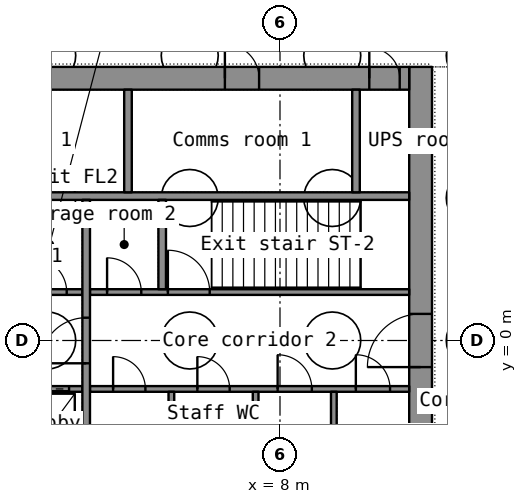
"""IFC4 building model, lengths in metres.
Left out: names, types, materials, properties, quantities, classifications, styles, units other than length and angle.
Written with IfcOpenShell. Run it as: python <this file> out.ifc"""

import sys

from ifc_helpers import new_model, si_unit, direction, frame, frame_2d, origin, place, context, subcontext, project, spatial, rectangle, extrude, element, fill, save


model = new_model("IFC4")
c1 = context("Model", 3, precision=1e-05, world=origin(), true_north=direction((0.0, 1.0)))
c2 = subcontext(c1, "Body", "Model", "MODEL_VIEW")
j1 = project(units=[si_unit("LENGTHUNIT", "METRE"), si_unit("PLANEANGLEUNIT", "RADIAN")], contexts=[c1])
p1 = place(None, origin())
s1 = spatial("IfcSite", under=j1, at=p1, CompositionType="ELEMENT")
p2 = place(p1, origin())
s2 = spatial("IfcBuilding", under=s1, at=p2, CompositionType="ELEMENT")
p3 = place(p2, frame((0.0, 0.0, -5.0)))
s3 = spatial("IfcBuildingStorey", under=s2, at=p3, CompositionType="ELEMENT", Elevation=-5.0)
p4 = place(p3, frame((11.7, -7.2, 0.0), z_axis=(0.0, 0.0, 1.0), x_axis=(0.0, 1.0, 0.0)))
e1 = element("IfcWall", 1, at=p4, inside=s3, PredefinedType="SHEAR", context=c2, shape_type="SweptSolid", body=[
    extrude(rectangle(XDim=14.4, YDim=0.6, at=frame_2d((7.2, 0.0))), origin(), (0.0, 0.0, 1.0), 4.6),
])
p5 = place(p4, frame((6.5, 0.0, 0.0)))
e2 = element("IfcOpeningElement", 2, at=p5, cuts=e1, PredefinedType="OPENING", context=c2, shape_type="SweptSolid", body=[
    extrude(rectangle(XDim=1.4, YDim=2.2, at=frame_2d((0.7, 1.1))), frame((0.0, 0.31, 0.0), z_axis=(0.0, -1.0, 0.0), x_axis=(1.0, 0.0, 0.0)), (0.0, 0.0, 1.0), 0.62),
])
p6 = place(p3, frame((-11.4, 6.9, 0.0), z_axis=(0.0, 0.0, 1.0), x_axis=(1.0, 0.0, 0.0)))
e3 = element("IfcWall", 3, at=p6, inside=s3, PredefinedType="SHEAR", context=c2, shape_type="SweptSolid", body=[
    extrude(rectangle(XDim=22.8, YDim=0.6, at=frame_2d((11.4, 0.0))), origin(), (0.0, 0.0, 1.0), 4.6),
])
p7 = place(p6, frame((1.85, 0.0, 0.0)))
e4 = element("IfcOpeningElement", 4, at=p7, cuts=e3, PredefinedType="OPENING", context=c2, shape_type="SweptSolid", body=[
    extrude(rectangle(XDim=1.1, YDim=2.2, at=frame_2d((0.55, 1.1))), frame((0.0, 0.31, 0.0), z_axis=(0.0, -1.0, 0.0), x_axis=(1.0, 0.0, 0.0)), (0.0, 0.0, 1.0), 0.62),
])
p8 = place(p6, frame((6.95, 0.0, 0.0)))
e5 = element("IfcOpeningElement", 5, at=p8, cuts=e3, PredefinedType="OPENING", context=c2, shape_type="SweptSolid", body=[
    extrude(rectangle(XDim=0.9, YDim=2.1, at=frame_2d((0.45, 1.05))), frame((0.0, 0.31, 0.0), z_axis=(0.0, -1.0, 0.0), x_axis=(1.0, 0.0, 0.0)), (0.0, 0.0, 1.0), 0.62),
])
p9 = place(p6, frame((11.95, 0.0, 0.0)))
e6 = element("IfcOpeningElement", 6, at=p9, cuts=e3, PredefinedType="OPENING", context=c2, shape_type="SweptSolid", body=[
    extrude(rectangle(XDim=0.9, YDim=2.1, at=frame_2d((0.45, 1.05))), frame((0.0, 0.31, 0.0), z_axis=(0.0, -1.0, 0.0), x_axis=(1.0, 0.0, 0.0)), (0.0, 0.0, 1.0), 0.62),
])
p10 = place(p6, frame((17.95, 0.0, 0.0)))
e7 = element("IfcOpeningElement", 7, at=p10, cuts=e3, PredefinedType="OPENING", context=c2, shape_type="SweptSolid", body=[
    extrude(rectangle(XDim=0.9, YDim=2.1, at=frame_2d((0.45, 1.05))), frame((0.0, 0.31, 0.0), z_axis=(0.0, -1.0, 0.0), x_axis=(1.0, 0.0, 0.0)), (0.0, 0.0, 1.0), 0.62),
])
p11 = place(p6, frame((0.25, 0.0, 0.0)))
e8 = element("IfcOpeningElement", 8, at=p11, cuts=e3, PredefinedType="OPENING", context=c2, shape_type="SweptSolid", body=[
    extrude(rectangle(XDim=0.8, YDim=2.05, at=frame_2d((0.4, 1.025))), frame((0.0, 0.31, 0.0), z_axis=(0.0, -1.0, 0.0), x_axis=(1.0, 0.0, 0.0)), (0.0, 0.0, 1.0), 0.62),
])
p12 = place(p6, frame((21.75, 0.0, 0.0)))
e9 = element("IfcOpeningElement", 9, at=p12, cuts=e3, PredefinedType="OPENING", context=c2, shape_type="SweptSolid", body=[
    extrude(rectangle(XDim=0.8, YDim=2.05, at=frame_2d((0.4, 1.025))), frame((0.0, 0.31, 0.0), z_axis=(0.0, -1.0, 0.0), x_axis=(1.0, 0.0, 0.0)), (0.0, 0.0, 1.0), 0.62),
])
p13 = place(p3, frame((-11.4, 3.8, 0.0), z_axis=(0.0, 0.0, 1.0), x_axis=(1.0, 0.0, 0.0)))
e10 = element("IfcWall", 10, at=p13, inside=s3, PredefinedType="SHEAR", context=c2, shape_type="SweptSolid", body=[
    extrude(rectangle(XDim=22.8, YDim=0.2, at=frame_2d((11.4, 0.0))), origin(), (0.0, 0.0, 1.0), 4.6),
])
p14 = place(p3, frame((10.0, 3.9, 0.0), z_axis=(0.0, 0.0, 1.0), x_axis=(0.0, 1.0, 0.0)))
e11 = element("IfcWall", 11, at=p14, inside=s3, PredefinedType="SHEAR", context=c2, shape_type="SweptSolid", body=[
    extrude(rectangle(XDim=2.7, YDim=0.2, at=frame_2d((1.35, 0.0))), origin(), (0.0, 0.0, 1.0), 4.6),
])
p15 = place(p3, frame((4.0, 3.9, 0.0), z_axis=(0.0, 0.0, 1.0), x_axis=(0.0, 1.0, 0.0)))
e12 = element("IfcWall", 12, at=p15, inside=s3, PredefinedType="PARTITIONING", context=c2, shape_type="SweptSolid", body=[
    extrude(rectangle(XDim=2.7, YDim=0.2, at=frame_2d((1.35, 0.0))), origin(), (0.0, 0.0, 1.0), 4.6),
])
p16 = place(p3, frame((-2.8, -1.275, 0.0), z_axis=(0.0, 0.0, 1.0), x_axis=(1.0, 0.0, 0.0)))
e13 = element("IfcWall", 13, at=p16, inside=s3, PredefinedType="SHEAR", context=c2, shape_type="SweptSolid", body=[
    extrude(rectangle(XDim=5.6, YDim=0.15, at=frame_2d((2.8, 0.0))), origin(), (0.0, 0.0, 1.0), 4.6),
])
p17 = place(p16, frame((4.15, 0.0, 0.0)))
e14 = element("IfcOpeningElement", 14, at=p17, cuts=e13, PredefinedType="OPENING", context=c2, shape_type="SweptSolid", body=[
    extrude(rectangle(XDim=1.1, YDim=2.2, at=frame_2d((0.55, 1.1))), frame((0.0, 0.085, 0.0), z_axis=(0.0, -1.0, 0.0), x_axis=(1.0, 0.0, 0.0)), (0.0, 0.0, 1.0), 0.17),
])
p18 = place(p16, frame((0.499, 0.0, 0.0)))
e15 = element("IfcOpeningElement", 15, at=p18, cuts=e13, PredefinedType="OPENING", context=c2, shape_type="SweptSolid", body=[
    extrude(rectangle(XDim=0.9, YDim=2.1, at=frame_2d((0.45, 1.05))), frame((0.0, 0.085, 0.0), z_axis=(0.0, -1.0, 0.0), x_axis=(1.0, 0.0, 0.0)), (0.0, 0.0, 1.0), 0.17),
])
p19 = place(p16, frame((2.374, 0.0, 0.0)))
e16 = element("IfcOpeningElement", 16, at=p19, cuts=e13, PredefinedType="OPENING", context=c2, shape_type="SweptSolid", body=[
    extrude(rectangle(XDim=0.9, YDim=2.1, at=frame_2d((0.45, 1.05))), frame((0.0, 0.085, 0.0), z_axis=(0.0, -1.0, 0.0), x_axis=(1.0, 0.0, 0.0)), (0.0, 0.0, 1.0), 0.17),
])
p20 = place(p3, frame((3.0, -1.275, 0.0), z_axis=(0.0, 0.0, 1.0), x_axis=(1.0, 0.0, 0.0)))
e17 = element("IfcWall", 17, at=p20, inside=s3, PredefinedType="PARTITIONING", context=c2, shape_type="SweptSolid", body=[
    extrude(rectangle(XDim=8.4, YDim=0.15, at=frame_2d((4.2, 0.0))), origin(), (0.0, 0.0, 1.0), 4.6),
])
p21 = place(p20, frame((0.608, 0.0, 0.0)))
e18 = element("IfcOpeningElement", 18, at=p21, cuts=e17, PredefinedType="OPENING", context=c2, shape_type="SweptSolid", body=[
    extrude(rectangle(XDim=0.85, YDim=2.1, at=frame_2d((0.425, 1.05))), frame((0.0, 0.085, 0.0), z_axis=(0.0, -1.0, 0.0), x_axis=(1.0, 0.0, 0.0)), (0.0, 0.0, 1.0), 0.17),
])
p22 = place(p20, frame((2.825, 0.0, 0.0)))
e19 = element("IfcOpeningElement", 19, at=p22, cuts=e17, PredefinedType="OPENING", context=c2, shape_type="SweptSolid", body=[
    extrude(rectangle(XDim=0.85, YDim=2.1, at=frame_2d((0.425, 1.05))), frame((0.0, 0.085, 0.0), z_axis=(0.0, -1.0, 0.0), x_axis=(1.0, 0.0, 0.0)), (0.0, 0.0, 1.0), 0.17),
])
p23 = place(p20, frame((4.938, 0.0, 0.0)))
e20 = element("IfcOpeningElement", 20, at=p23, cuts=e17, PredefinedType="OPENING", context=c2, shape_type="SweptSolid", body=[
    extrude(rectangle(XDim=0.9, YDim=2.1, at=frame_2d((0.45, 1.05))), frame((0.0, 0.085, 0.0), z_axis=(0.0, -1.0, 0.0), x_axis=(1.0, 0.0, 0.0)), (0.0, 0.0, 1.0), 0.17),
])
p24 = place(p20, frame((6.996, 0.0, 0.0)))
e21 = element("IfcOpeningElement", 21, at=p24, cuts=e17, PredefinedType="OPENING", context=c2, shape_type="SweptSolid", body=[
    extrude(rectangle(XDim=0.9, YDim=2.1, at=frame_2d((0.45, 1.05))), frame((0.0, 0.085, 0.0), z_axis=(0.0, -1.0, 0.0), x_axis=(1.0, 0.0, 0.0)), (0.0, 0.0, 1.0), 0.17),
])
p25 = place(p3, frame((-2.8, 1.275, 0.0), z_axis=(0.0, 0.0, 1.0), x_axis=(1.0, 0.0, 0.0)))
e22 = element("IfcWall", 22, at=p25, inside=s3, PredefinedType="SHEAR", context=c2, shape_type="SweptSolid", body=[
    extrude(rectangle(XDim=5.6, YDim=0.15, at=frame_2d((2.8, 0.0))), origin(), (0.0, 0.0, 1.0), 4.6),
])
p26 = place(p25, frame((0.35, 0.0, 0.0)))
e23 = element("IfcOpeningElement", 23, at=p26, cuts=e22, PredefinedType="OPENING", context=c2, shape_type="SweptSolid", body=[
    extrude(rectangle(XDim=1.1, YDim=2.2, at=frame_2d((0.55, 1.1))), frame((0.0, 0.085, 0.0), z_axis=(0.0, -1.0, 0.0), x_axis=(1.0, 0.0, 0.0)), (0.0, 0.0, 1.0), 0.17),
])
p27 = place(p25, frame((2.413, 0.0, 0.0)))
e24 = element("IfcOpeningElement", 24, at=p27, cuts=e22, PredefinedType="OPENING", context=c2, shape_type="SweptSolid", body=[
    extrude(rectangle(XDim=0.9, YDim=2.1, at=frame_2d((0.45, 1.05))), frame((0.0, 0.085, 0.0), z_axis=(0.0, -1.0, 0.0), x_axis=(1.0, 0.0, 0.0)), (0.0, 0.0, 1.0), 0.17),
])
p28 = place(p25, frame((4.288, 0.0, 0.0)))
e25 = element("IfcOpeningElement", 25, at=p28, cuts=e22, PredefinedType="OPENING", context=c2, shape_type="SweptSolid", body=[
    extrude(rectangle(XDim=0.9, YDim=2.1, at=frame_2d((0.45, 1.05))), frame((0.0, 0.085, 0.0), z_axis=(0.0, -1.0, 0.0), x_axis=(1.0, 0.0, 0.0)), (0.0, 0.0, 1.0), 0.17),
])
p29 = place(p3, frame((3.0, 1.275, 0.0), z_axis=(0.0, 0.0, 1.0), x_axis=(1.0, 0.0, 0.0)))
e26 = element("IfcWall", 26, at=p29, inside=s3, PredefinedType="SHEAR", context=c2, shape_type="SweptSolid", body=[
    extrude(rectangle(XDim=8.4, YDim=0.15, at=frame_2d((4.2, 0.0))), origin(), (0.0, 0.0, 1.0), 4.6),
])
p30 = place(p29, frame((2.05, 0.0, 0.0)))
e27 = element("IfcOpeningElement", 27, at=p30, cuts=e26, PredefinedType="OPENING", context=c2, shape_type="SweptSolid", body=[
    extrude(rectangle(XDim=1.1, YDim=2.15, at=frame_2d((0.55, 1.075))), frame((0.0, 0.085, 0.0), z_axis=(0.0, -1.0, 0.0), x_axis=(1.0, 0.0, 0.0)), (0.0, 0.0, 1.0), 0.17),
])
p31 = place(p29, frame((0.45, 0.0, 0.0)))
e28 = element("IfcOpeningElement", 28, at=p31, cuts=e26, PredefinedType="OPENING", context=c2, shape_type="SweptSolid", body=[
    extrude(rectangle(XDim=0.9, YDim=2.1, at=frame_2d((0.45, 1.05))), frame((0.0, 0.085, 0.0), z_axis=(0.0, -1.0, 0.0), x_axis=(1.0, 0.0, 0.0)), (0.0, 0.0, 1.0), 0.17),
])
p32 = place(p3, frame((2.9, -3.7, 0.0), z_axis=(0.0, 0.0, 1.0), x_axis=(0.0, 1.0, 0.0)))
e29 = element("IfcWall", 29, at=p32, inside=s3, PredefinedType="SHEAR", context=c2, shape_type="SweptSolid", body=[
    extrude(rectangle(XDim=7.4, YDim=0.2, at=frame_2d((3.7, 0.0))), origin(), (0.0, 0.0, 1.0), 4.6),
])
p33 = place(p32, frame((3.1, 0.0, 0.0)))
e30 = element("IfcOpeningElement", 30, at=p33, cuts=e29, PredefinedType="OPENING", context=c2, shape_type="SweptSolid", body=[
    extrude(rectangle(XDim=1.2, YDim=2.2, at=frame_2d((0.6, 1.1))), frame((0.0, 0.11, 0.0), z_axis=(0.0, -1.0, 0.0), x_axis=(1.0, 0.0, 0.0)), (0.0, 0.0, 1.0), 0.22),
])
p34 = place(p3, frame((4.9, 1.35, 0.0), z_axis=(0.0, 0.0, 1.0), x_axis=(0.0, 1.0, 0.0)))
e31 = element("IfcWall", 31, at=p34, inside=s3, PredefinedType="SHEAR", context=c2, shape_type="SweptSolid", body=[
    extrude(rectangle(XDim=2.35, YDim=0.2, at=frame_2d((1.175, 0.0))), origin(), (0.0, 0.0, 1.0), 4.6),
])
for number, where, z_axis, x_axis in (
    (32, (5.142, -3.7, 0.0), (0.0, 0.0, 1.0), (0.0, 1.0, 0.0)),
    (33, (7.359, -3.7, 0.0), (0.0, 0.0, 1.0), (0.0, 1.0, 0.0)),
    (34, (9.417, -3.7, 0.0), (0.0, 0.0, 1.0), (0.0, 1.0, 0.0)),
):
    element("IfcWall", number, at=place(p3, frame(where, z_axis=z_axis, x_axis=x_axis)), inside=s3, PredefinedType="PARTITIONING", context=c2, shape_type="SweptSolid", body=[
        extrude(rectangle(XDim=2.35, YDim=0.15, at=frame_2d((1.175, 0.0))), origin(), (0.0, 0.0, 1.0), 4.6),
    ])
p35 = place(p10, origin())
e35 = element("IfcDoor", 35, at=p35, inside=s3, OperationType="SINGLE_SWING_LEFT", PredefinedType="DOOR", context=c2, shape_type="SweptSolid", body=[
    extrude(rectangle(XDim=0.9, YDim=2.1, at=frame_2d((0.45, 1.05))), frame((0.0, 0.025, 0.0), z_axis=(0.0, -1.0, 0.0), x_axis=(1.0, 0.0, 0.0)), (0.0, 0.0, 1.0), 0.05),
])
fill(e7, e35)
p36 = place(p12, origin())
e36 = element("IfcDoor", 36, at=p36, inside=s3, OperationType="SINGLE_SWING_LEFT", PredefinedType="DOOR", context=c2, shape_type="SweptSolid", body=[
    extrude(rectangle(XDim=0.8, YDim=2.05, at=frame_2d((0.4, 1.025))), frame((0.0, 0.025, 0.0), z_axis=(0.0, -1.0, 0.0), x_axis=(1.0, 0.0, 0.0)), (0.0, 0.0, 1.0), 0.05),
])
fill(e9, e36)
p37 = place(p5, origin())
e37 = element("IfcDoor", 37, at=p37, inside=s3, OperationType="DOUBLE_DOOR_SINGLE_SWING", PredefinedType="DOOR", context=c2, shape_type="SweptSolid", body=[
    extrude(rectangle(XDim=1.4, YDim=2.2, at=frame_2d((0.7, 1.1))), frame((0.0, 0.025, 0.0), z_axis=(0.0, -1.0, 0.0), x_axis=(1.0, 0.0, 0.0)), (0.0, 0.0, 1.0), 0.05),
])
fill(e2, e37)
p38 = place(p33, origin())
e38 = element("IfcDoor", 38, at=p38, inside=s3, OperationType="SINGLE_SWING_LEFT", PredefinedType="DOOR", context=c2, shape_type="SweptSolid", body=[
    extrude(rectangle(XDim=1.2, YDim=2.2, at=frame_2d((0.6, 1.1))), frame((0.0, 0.025, 0.0), z_axis=(0.0, -1.0, 0.0), x_axis=(1.0, 0.0, 0.0)), (0.0, 0.0, 1.0), 0.05),
])
fill(e30, e38)
p39 = place(p17, origin())
e39 = element("IfcDoor", 39, at=p39, inside=s3, OperationType="DOUBLE_DOOR_SLIDING", PredefinedType="DOOR", context=c2, shape_type="SweptSolid", body=[
    extrude(rectangle(XDim=1.1, YDim=2.2, at=frame_2d((0.55, 1.1))), frame((0.0, 0.025, 0.0), z_axis=(0.0, -1.0, 0.0), x_axis=(1.0, 0.0, 0.0)), (0.0, 0.0, 1.0), 0.05),
])
fill(e14, e39)
p40 = place(p30, origin())
e40 = element("IfcDoor", 40, at=p40, inside=s3, OperationType="SINGLE_SWING_LEFT", PredefinedType="DOOR", context=c2, shape_type="SweptSolid", body=[
    extrude(rectangle(XDim=1.1, YDim=2.15, at=frame_2d((0.55, 1.075))), frame((0.0, 0.025, 0.0), z_axis=(0.0, -1.0, 0.0), x_axis=(1.0, 0.0, 0.0)), (0.0, 0.0, 1.0), 0.05),
])
fill(e27, e40)
p41 = place(p21, origin())
e41 = element("IfcDoor", 41, at=p41, inside=s3, OperationType="SINGLE_SWING_LEFT", PredefinedType="DOOR", context=c2, shape_type="SweptSolid", body=[
    extrude(rectangle(XDim=0.85, YDim=2.1, at=frame_2d((0.425, 1.05))), frame((0.0, 0.025, 0.0), z_axis=(0.0, -1.0, 0.0), x_axis=(1.0, 0.0, 0.0)), (0.0, 0.0, 1.0), 0.05),
])
fill(e18, e41)
p42 = place(p22, origin())
e42 = element("IfcDoor", 42, at=p42, inside=s3, OperationType="SINGLE_SWING_LEFT", PredefinedType="DOOR", context=c2, shape_type="SweptSolid", body=[
    extrude(rectangle(XDim=0.85, YDim=2.1, at=frame_2d((0.425, 1.05))), frame((0.0, 0.025, 0.0), z_axis=(0.0, -1.0, 0.0), x_axis=(1.0, 0.0, 0.0)), (0.0, 0.0, 1.0), 0.05),
])
fill(e19, e42)
p43 = place(p23, origin())
e43 = element("IfcDoor", 43, at=p43, inside=s3, OperationType="SINGLE_SWING_LEFT", PredefinedType="DOOR", context=c2, shape_type="SweptSolid", body=[
    extrude(rectangle(XDim=0.9, YDim=2.1, at=frame_2d((0.45, 1.05))), frame((0.0, 0.025, 0.0), z_axis=(0.0, -1.0, 0.0), x_axis=(1.0, 0.0, 0.0)), (0.0, 0.0, 1.0), 0.05),
])
fill(e20, e43)
p44 = place(p24, origin())
e44 = element("IfcDoor", 44, at=p44, inside=s3, OperationType="SINGLE_SWING_LEFT", PredefinedType="DOOR", context=c2, shape_type="SweptSolid", body=[
    extrude(rectangle(XDim=0.9, YDim=2.1, at=frame_2d((0.45, 1.05))), frame((0.0, 0.025, 0.0), z_axis=(0.0, -1.0, 0.0), x_axis=(1.0, 0.0, 0.0)), (0.0, 0.0, 1.0), 0.05),
])
fill(e21, e44)
p45 = place(p28, origin())
e45 = element("IfcDoor", 45, at=p45, inside=s3, OperationType="SINGLE_SWING_LEFT", PredefinedType="DOOR", context=c2, shape_type="SweptSolid", body=[
    extrude(rectangle(XDim=0.9, YDim=2.1, at=frame_2d((0.45, 1.05))), frame((0.0, 0.025, 0.0), z_axis=(0.0, -1.0, 0.0), x_axis=(1.0, 0.0, 0.0)), (0.0, 0.0, 1.0), 0.05),
])
fill(e25, e45)
p46 = place(p31, origin())
e46 = element("IfcDoor", 46, at=p46, inside=s3, OperationType="SINGLE_SWING_LEFT", PredefinedType="DOOR", context=c2, shape_type="SweptSolid", body=[
    extrude(rectangle(XDim=0.9, YDim=2.1, at=frame_2d((0.45, 1.05))), frame((0.0, 0.025, 0.0), z_axis=(0.0, -1.0, 0.0), x_axis=(1.0, 0.0, 0.0)), (0.0, 0.0, 1.0), 0.05),
])
fill(e28, e46)
save(model, sys.argv[1])
